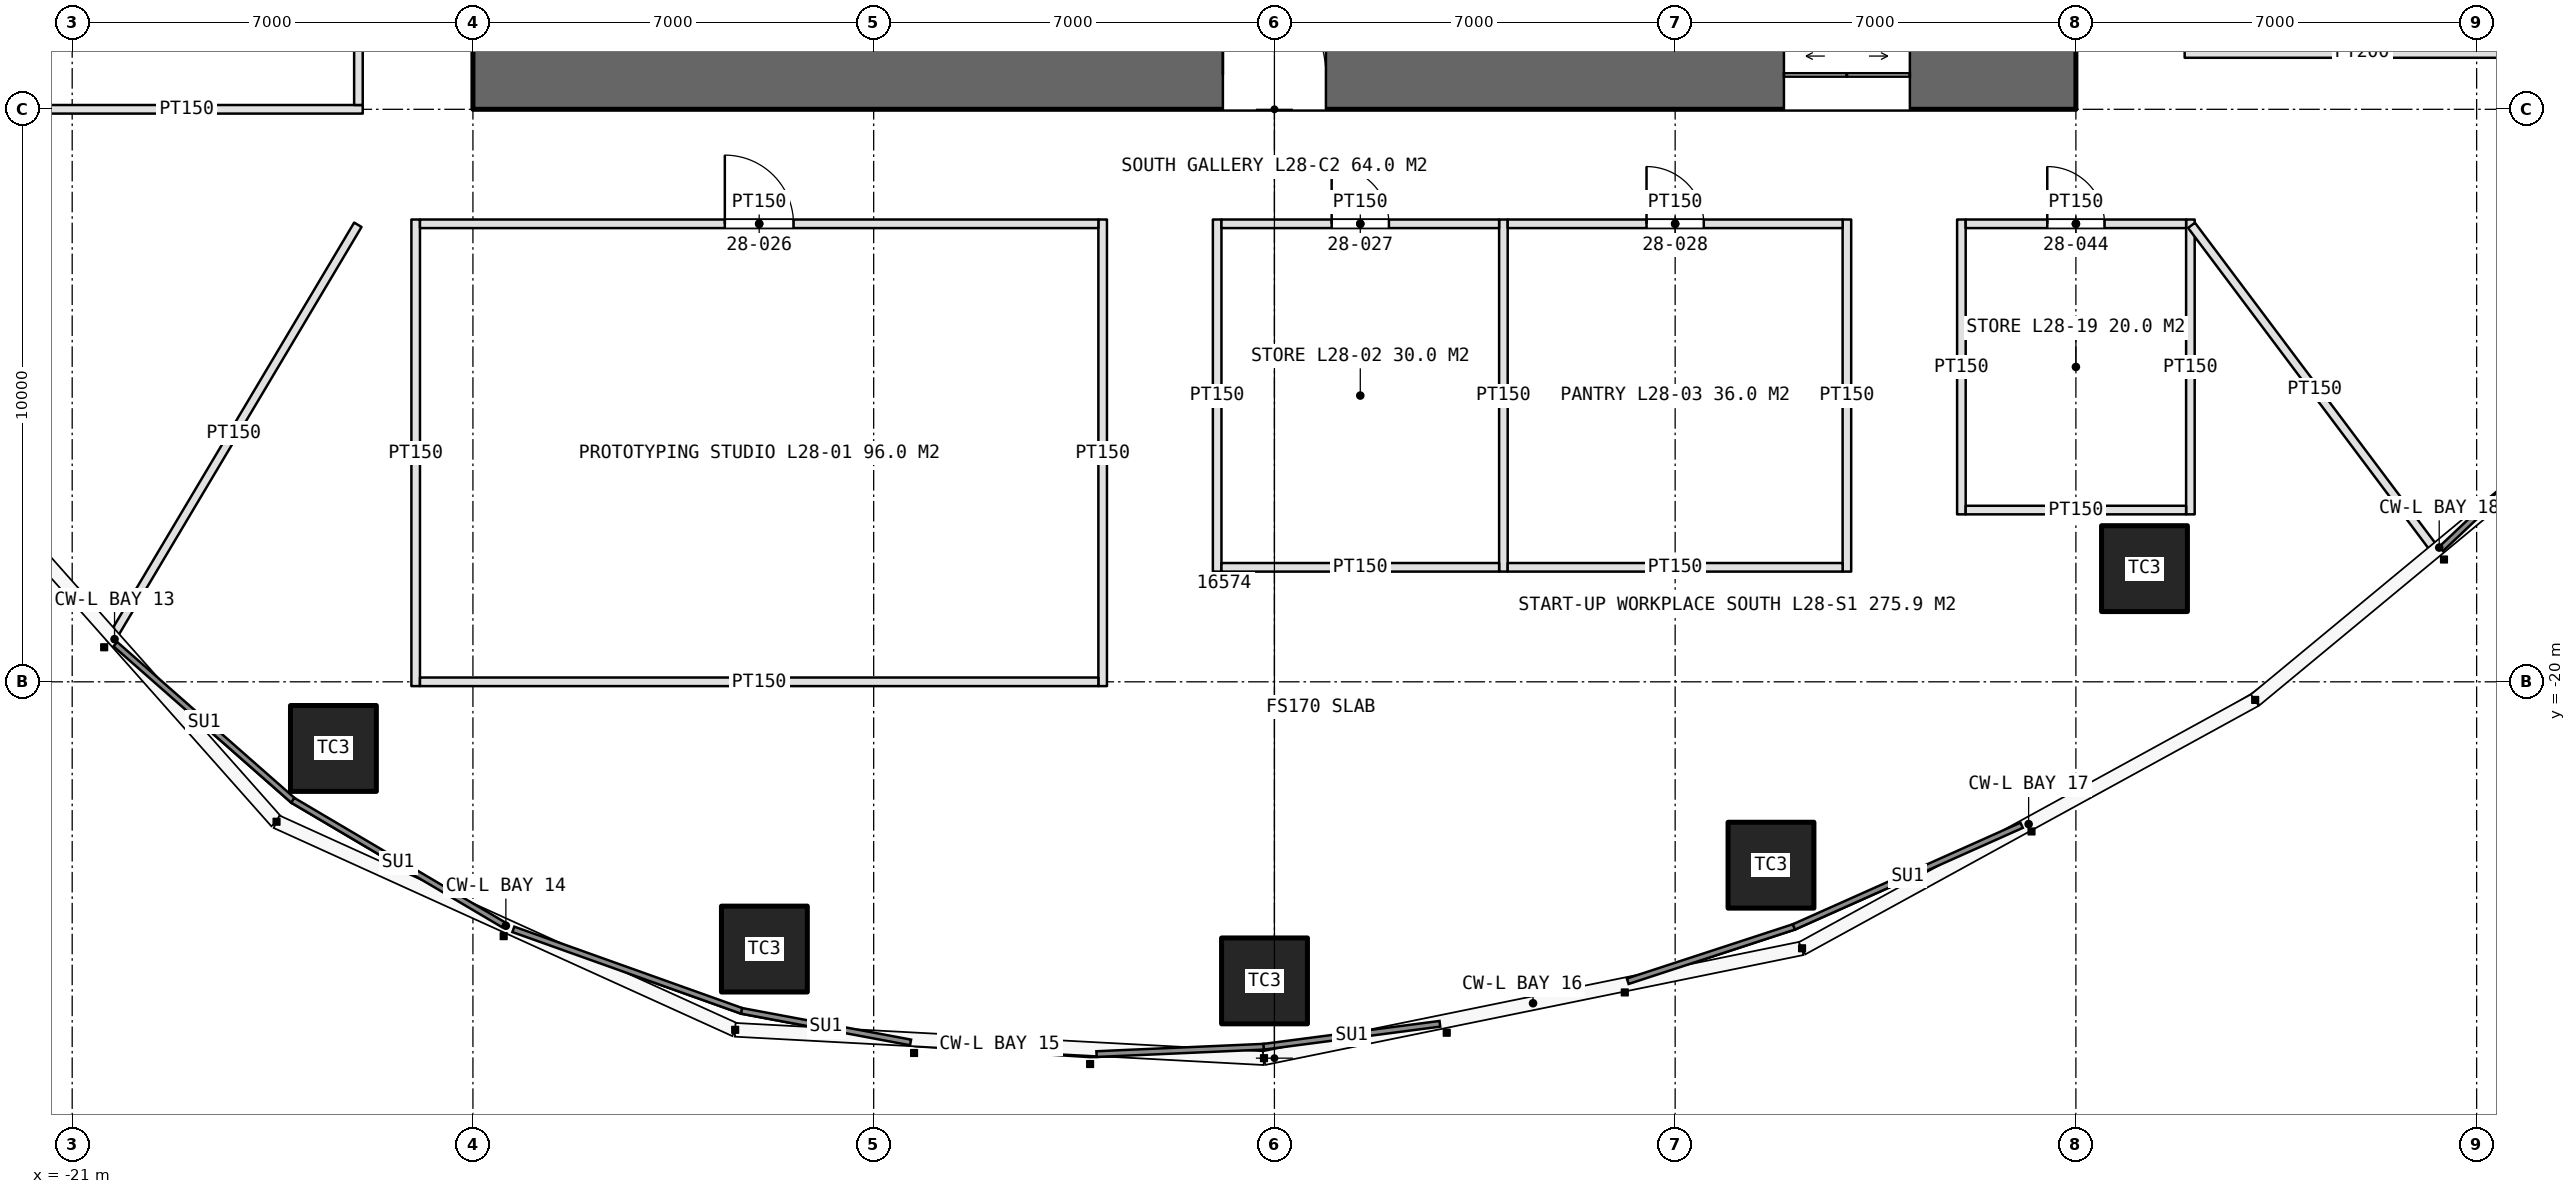
"""IFC4 building model, lengths in metres.
Left out: names, types, materials, properties, quantities, classifications, styles, units other than length and angle.
Written with IfcOpenShell. Run it as: python <this file> out.ifc"""

import sys

from ifc_helpers import new_model, si_unit, direction, frame, frame_2d, origin, origin_2d, place, context, subcontext, project, spatial, rectangle, extrude, element, fill, save


model = new_model("IFC4")
c1 = context("Model", 3, precision=1e-05, world=origin(), true_north=direction((0.0, 1.0)))
c2 = subcontext(c1, "Body", "Model", "MODEL_VIEW")
j1 = project(units=[si_unit("LENGTHUNIT", "METRE"), si_unit("PLANEANGLEUNIT", "RADIAN")], contexts=[c1])
p1 = place(None, origin())
s1 = spatial("IfcSite", under=j1, at=p1, CompositionType="ELEMENT")
p2 = place(p1, origin())
s2 = spatial("IfcBuilding", under=s1, at=p2, CompositionType="ELEMENT")
p3 = place(p2, frame((0.0, 0.0, 134.4)))
s3 = spatial("IfcBuildingStorey", under=s2, at=p3, CompositionType="ELEMENT", Elevation=134.4)
p4 = place(p3, frame((-14.0, -9.4, 0.0), z_axis=(0.0, 0.0, 1.0), x_axis=(1.0, 0.0, 0.0)))
e1 = element("IfcWall", 1, at=p4, inside=s3, PredefinedType="SHEAR", context=c2, shape_type="SweptSolid", body=[
    extrude(rectangle(XDim=28.0, YDim=1.2, at=frame_2d((14.0, 0.0))), origin(), (0.0, 0.0, 1.0), 4.2),
])
p5 = place(p4, frame((13.1, 0.0, 0.0)))
e2 = element("IfcOpeningElement", 2, at=p5, cuts=e1, PredefinedType="OPENING", context=c2, shape_type="SweptSolid", body=[
    extrude(rectangle(XDim=1.8, YDim=2.4, at=frame_2d((0.9, 1.2))), frame((0.0, 0.61, 0.0), z_axis=(0.0, -1.0, 0.0), x_axis=(1.0, 0.0, 0.0)), (0.0, 0.0, 1.0), 1.22),
])
p6 = place(p4, frame((22.9, 0.0, 0.0)))
e3 = element("IfcOpeningElement", 3, at=p6, cuts=e1, PredefinedType="OPENING", context=c2, shape_type="SweptSolid", body=[
    extrude(rectangle(XDim=2.2, YDim=2.7, at=frame_2d((1.1, 1.35))), frame((0.0, 0.61, 0.0), z_axis=(0.0, -1.0, 0.0), x_axis=(1.0, 0.0, 0.0)), (0.0, 0.0, 1.0), 1.22),
])
for number, where, z_axis, x_axis in (
    (4, (-16.437, -21.164, 0.0), (0.0, 0.0, 1.0), (1.0, 0.0, 0.0)),
    (5, (-8.909, -24.668, 0.0), (0.0, 0.0, 1.0), (1.0, 0.0, 0.0)),
    (6, (-0.173, -25.224, 0.0), (0.0, 0.0, 1.0), (1.0, 0.0, 0.0)),
    (7, (8.674, -23.203, 0.0), (0.0, 0.0, 1.0), (1.0, 0.0, 0.0)),
    (8, (15.198, -18.023, 0.0), (0.0, 0.0, 1.0), (1.0, 0.0, 0.0)),
):
    element("IfcColumn", number, at=place(p3, frame(where, z_axis=z_axis, x_axis=x_axis)), inside=s3, PredefinedType="COLUMN", context=c2, shape_type="SweptSolid", body=[
        extrude(rectangle(XDim=1.5, YDim=1.5, at=origin_2d()), origin(), (0.0, 0.0, 1.0), 4.2),
    ])
for number, where, z_axis, x_axis in (
    (9, (-15.0, -11.925, 0.0), (0.0, 0.0, 1.0), (0.0, -1.0, 0.0)),
    (10, (-3.0, -11.925, 0.0), (0.0, 0.0, 1.0), (0.0, -1.0, 0.0)),
):
    element("IfcWall", number, at=place(p3, frame(where, z_axis=z_axis, x_axis=x_axis)), inside=s3, PredefinedType="PARTITIONING", context=c2, shape_type="SweptSolid", body=[
        extrude(rectangle(XDim=8.15, YDim=0.15, at=frame_2d((4.075, 0.0))), origin(), (0.0, 0.0, 1.0), 3.0),
    ])
p7 = place(p3, frame((-14.925, -12.0, 0.0), z_axis=(0.0, 0.0, 1.0), x_axis=(1.0, 0.0, 0.0)))
e11 = element("IfcWall", 11, at=p7, inside=s3, PredefinedType="PARTITIONING", context=c2, shape_type="SweptSolid", body=[
    extrude(rectangle(XDim=11.85, YDim=0.15, at=frame_2d((5.925, 0.0))), origin(), (0.0, 0.0, 1.0), 3.0),
])
p8 = place(p7, frame((5.325, 0.0, 0.0)))
e12 = element("IfcOpeningElement", 12, at=p8, cuts=e11, PredefinedType="OPENING", context=c2, shape_type="SweptSolid", body=[
    extrude(rectangle(XDim=1.2, YDim=2.4, at=frame_2d((0.6, 1.2))), frame((0.0, 0.085, 0.0), z_axis=(0.0, -1.0, 0.0), x_axis=(1.0, 0.0, 0.0)), (0.0, 0.0, 1.0), 0.17),
])
p9 = place(p3, frame((-14.925, -20.0, 0.0), z_axis=(0.0, 0.0, 1.0), x_axis=(1.0, 0.0, 0.0)))
e13 = element("IfcWall", 13, at=p9, inside=s3, PredefinedType="PARTITIONING", context=c2, shape_type="SweptSolid", body=[
    extrude(rectangle(XDim=11.85, YDim=0.15, at=frame_2d((5.925, 0.0))), origin(), (0.0, 0.0, 1.0), 3.0),
])
for number, where, z_axis, x_axis in (
    (14, (-1.0, -11.925, 0.0), (0.0, 0.0, 1.0), (0.0, -1.0, 0.0)),
    (15, (4.0, -11.925, 0.0), (0.0, 0.0, 1.0), (0.0, -1.0, 0.0)),
    (16, (10.0, -11.925, 0.0), (0.0, 0.0, 1.0), (0.0, -1.0, 0.0)),
):
    element("IfcWall", number, at=place(p3, frame(where, z_axis=z_axis, x_axis=x_axis)), inside=s3, PredefinedType="PARTITIONING", context=c2, shape_type="SweptSolid", body=[
        extrude(rectangle(XDim=6.15, YDim=0.15, at=frame_2d((3.075, 0.0))), origin(), (0.0, 0.0, 1.0), 3.0),
    ])
p10 = place(p3, frame((-0.925, -12.0, 0.0), z_axis=(0.0, 0.0, 1.0), x_axis=(1.0, 0.0, 0.0)))
e17 = element("IfcWall", 17, at=p10, inside=s3, PredefinedType="PARTITIONING", context=c2, shape_type="SweptSolid", body=[
    extrude(rectangle(XDim=4.85, YDim=0.15, at=frame_2d((2.425, 0.0))), origin(), (0.0, 0.0, 1.0), 3.0),
])
p11 = place(p10, frame((1.925, 0.0, 0.0)))
e18 = element("IfcOpeningElement", 18, at=p11, cuts=e17, PredefinedType="OPENING", context=c2, shape_type="SweptSolid", body=[
    extrude(rectangle(XDim=1.0, YDim=2.2, at=frame_2d((0.5, 1.1))), frame((0.0, 0.085, 0.0), z_axis=(0.0, -1.0, 0.0), x_axis=(1.0, 0.0, 0.0)), (0.0, 0.0, 1.0), 0.17),
])
p12 = place(p3, frame((-0.925, -18.0, 0.0), z_axis=(0.0, 0.0, 1.0), x_axis=(1.0, 0.0, 0.0)))
e19 = element("IfcWall", 19, at=p12, inside=s3, PredefinedType="PARTITIONING", context=c2, shape_type="SweptSolid", body=[
    extrude(rectangle(XDim=4.85, YDim=0.15, at=frame_2d((2.425, 0.0))), origin(), (0.0, 0.0, 1.0), 3.0),
])
p13 = place(p3, frame((4.075, -12.0, 0.0), z_axis=(0.0, 0.0, 1.0), x_axis=(1.0, 0.0, 0.0)))
e20 = element("IfcWall", 20, at=p13, inside=s3, PredefinedType="PARTITIONING", context=c2, shape_type="SweptSolid", body=[
    extrude(rectangle(XDim=5.85, YDim=0.15, at=frame_2d((2.925, 0.0))), origin(), (0.0, 0.0, 1.0), 3.0),
])
p14 = place(p13, frame((2.425, 0.0, 0.0)))
e21 = element("IfcOpeningElement", 21, at=p14, cuts=e20, PredefinedType="OPENING", context=c2, shape_type="SweptSolid", body=[
    extrude(rectangle(XDim=1.0, YDim=2.2, at=frame_2d((0.5, 1.1))), frame((0.0, 0.085, 0.0), z_axis=(0.0, -1.0, 0.0), x_axis=(1.0, 0.0, 0.0)), (0.0, 0.0, 1.0), 0.17),
])
p15 = place(p3, frame((4.075, -18.0, 0.0), z_axis=(0.0, 0.0, 1.0), x_axis=(1.0, 0.0, 0.0)))
e22 = element("IfcWall", 22, at=p15, inside=s3, PredefinedType="PARTITIONING", context=c2, shape_type="SweptSolid", body=[
    extrude(rectangle(XDim=5.85, YDim=0.15, at=frame_2d((2.925, 0.0))), origin(), (0.0, 0.0, 1.0), 3.0),
])
p16 = place(p3, frame((15.9, -9.0, 0.0), z_axis=(0.0, 0.0, 1.0), x_axis=(1.0, 0.0, 0.0)))
e23 = element("IfcWall", 23, at=p16, inside=s3, PredefinedType="PARTITIONING", context=c2, shape_type="SweptSolid", body=[
    extrude(rectangle(XDim=6.2, YDim=0.2, at=frame_2d((3.1, 0.0))), origin(), (0.0, 0.0, 1.0), 3.0),
])
p17 = place(p3, frame((-15.925, -10.0, 0.0), z_axis=(0.0, 0.0, 1.0), x_axis=(-1.0, 0.0, 0.0)))
e24 = element("IfcWall", 24, at=p17, inside=s3, PredefinedType="PARTITIONING", context=c2, shape_type="SweptSolid", body=[
    extrude(rectangle(XDim=6.15, YDim=0.15, at=frame_2d((3.075, 0.0))), origin(), (0.0, 0.0, 1.0), 3.0),
])
p18 = place(p3, frame((-16.0, -9.925, 0.0), z_axis=(0.0, 0.0, 1.0), x_axis=(0.0, 1.0, 0.0)))
e25 = element("IfcWall", 25, at=p18, inside=s3, PredefinedType="PARTITIONING", context=c2, shape_type="SweptSolid", body=[
    extrude(rectangle(XDim=4.825, YDim=0.15, at=frame_2d((2.413, 0.0))), origin(), (0.0, 0.0, 1.0), 3.0),
])
p19 = place(p18, frame((1.913, 0.0, 0.0)))
e26 = element("IfcOpeningElement", 26, at=p19, cuts=e25, PredefinedType="OPENING", context=c2, shape_type="SweptSolid", body=[
    extrude(rectangle(XDim=1.0, YDim=2.2, at=frame_2d((0.5, 1.1))), frame((0.0, 0.085, 0.0), z_axis=(0.0, -1.0, 0.0), x_axis=(1.0, 0.0, 0.0)), (0.0, 0.0, 1.0), 0.17),
])
for number, where, z_axis, x_axis in (
    (27, (12.0, -11.925, 0.0), (0.0, 0.0, 1.0), (0.0, -1.0, 0.0)),
    (28, (16.0, -11.925, 0.0), (0.0, 0.0, 1.0), (0.0, -1.0, 0.0)),
):
    element("IfcWall", number, at=place(p3, frame(where, z_axis=z_axis, x_axis=x_axis)), inside=s3, PredefinedType="PARTITIONING", context=c2, shape_type="SweptSolid", body=[
        extrude(rectangle(XDim=5.15, YDim=0.15, at=frame_2d((2.575, 0.0))), origin(), (0.0, 0.0, 1.0), 3.0),
    ])
p20 = place(p3, frame((12.075, -12.0, 0.0), z_axis=(0.0, 0.0, 1.0), x_axis=(1.0, 0.0, 0.0)))
e29 = element("IfcWall", 29, at=p20, inside=s3, PredefinedType="PARTITIONING", context=c2, shape_type="SweptSolid", body=[
    extrude(rectangle(XDim=3.85, YDim=0.15, at=frame_2d((1.925, 0.0))), origin(), (0.0, 0.0, 1.0), 3.0),
])
p21 = place(p20, frame((1.425, 0.0, 0.0)))
e30 = element("IfcOpeningElement", 30, at=p21, cuts=e29, PredefinedType="OPENING", context=c2, shape_type="SweptSolid", body=[
    extrude(rectangle(XDim=1.0, YDim=2.2, at=frame_2d((0.5, 1.1))), frame((0.0, 0.085, 0.0), z_axis=(0.0, -1.0, 0.0), x_axis=(1.0, 0.0, 0.0)), (0.0, 0.0, 1.0), 0.17),
])
p22 = place(p3, frame((12.075, -17.0, 0.0), z_axis=(0.0, 0.0, 1.0), x_axis=(1.0, 0.0, 0.0)))
e31 = element("IfcWall", 31, at=p22, inside=s3, PredefinedType="PARTITIONING", context=c2, shape_type="SweptSolid", body=[
    extrude(rectangle(XDim=3.85, YDim=0.15, at=frame_2d((1.925, 0.0))), origin(), (0.0, 0.0, 1.0), 3.0),
])
p23 = place(p3, frame((-16.01, -12.017, 0.0), z_axis=(0.0, 0.0, 1.0), x_axis=(-0.511508688443, -0.85927810495, 0.0)))
e32 = element("IfcWall", 32, at=p23, inside=s3, PredefinedType="PARTITIONING", context=c2, shape_type="SweptSolid", body=[
    extrude(rectangle(XDim=8.47, YDim=0.15, at=frame_2d((4.235, 0.0))), origin(), (0.0, 0.0, 1.0), 3.0),
])
p24 = place(p3, frame((16.02, -12.027, 0.0), z_axis=(0.0, 0.0, 1.0), x_axis=(0.600043534749, -0.799967347087, 0.0)))
e33 = element("IfcWall", 33, at=p24, inside=s3, PredefinedType="PARTITIONING", context=c2, shape_type="SweptSolid", body=[
    extrude(rectangle(XDim=7.178, YDim=0.15, at=frame_2d((3.589, 0.0))), origin(), (0.0, 0.0, 1.0), 3.0),
])
p25 = place(p5, origin())
e34 = element("IfcDoor", 34, at=p25, inside=s3, OperationType="DOUBLE_DOOR_SINGLE_SWING", PredefinedType="DOOR", context=c2, shape_type="SweptSolid", body=[
    extrude(rectangle(XDim=1.8, YDim=2.4, at=frame_2d((0.9, 1.2))), frame((0.0, 0.025, 0.0), z_axis=(0.0, -1.0, 0.0), x_axis=(1.0, 0.0, 0.0)), (0.0, 0.0, 1.0), 0.05),
])
fill(e2, e34)
p26 = place(p6, origin())
e35 = element("IfcDoor", 35, at=p26, inside=s3, OperationType="DOUBLE_DOOR_SLIDING", PredefinedType="DOOR", context=c2, shape_type="SweptSolid", body=[
    extrude(rectangle(XDim=2.2, YDim=2.7, at=frame_2d((1.1, 1.35))), frame((0.0, 0.025, 0.0), z_axis=(0.0, -1.0, 0.0), x_axis=(1.0, 0.0, 0.0)), (0.0, 0.0, 1.0), 0.05),
])
fill(e3, e35)
p27 = place(p8, origin())
e36 = element("IfcDoor", 36, at=p27, inside=s3, OperationType="SINGLE_SWING_LEFT", PredefinedType="DOOR", context=c2, shape_type="SweptSolid", body=[
    extrude(rectangle(XDim=1.2, YDim=2.4, at=frame_2d((0.6, 1.2))), frame((0.0, 0.025, 0.0), z_axis=(0.0, -1.0, 0.0), x_axis=(1.0, 0.0, 0.0)), (0.0, 0.0, 1.0), 0.05),
])
fill(e12, e36)
p28 = place(p11, origin())
e37 = element("IfcDoor", 37, at=p28, inside=s3, OperationType="SINGLE_SWING_LEFT", PredefinedType="DOOR", context=c2, shape_type="SweptSolid", body=[
    extrude(rectangle(XDim=1.0, YDim=2.2, at=frame_2d((0.5, 1.1))), frame((0.0, 0.025, 0.0), z_axis=(0.0, -1.0, 0.0), x_axis=(1.0, 0.0, 0.0)), (0.0, 0.0, 1.0), 0.05),
])
fill(e18, e37)
p29 = place(p14, origin())
e38 = element("IfcDoor", 38, at=p29, inside=s3, OperationType="SINGLE_SWING_LEFT", PredefinedType="DOOR", context=c2, shape_type="SweptSolid", body=[
    extrude(rectangle(XDim=1.0, YDim=2.2, at=frame_2d((0.5, 1.1))), frame((0.0, 0.025, 0.0), z_axis=(0.0, -1.0, 0.0), x_axis=(1.0, 0.0, 0.0)), (0.0, 0.0, 1.0), 0.05),
])
fill(e21, e38)
p30 = place(p21, origin())
e39 = element("IfcDoor", 39, at=p30, inside=s3, OperationType="SINGLE_SWING_LEFT", PredefinedType="DOOR", context=c2, shape_type="SweptSolid", body=[
    extrude(rectangle(XDim=1.0, YDim=2.2, at=frame_2d((0.5, 1.1))), frame((0.0, 0.025, 0.0), z_axis=(0.0, -1.0, 0.0), x_axis=(1.0, 0.0, 0.0)), (0.0, 0.0, 1.0), 0.05),
])
fill(e30, e39)
save(model, sys.argv[1])
